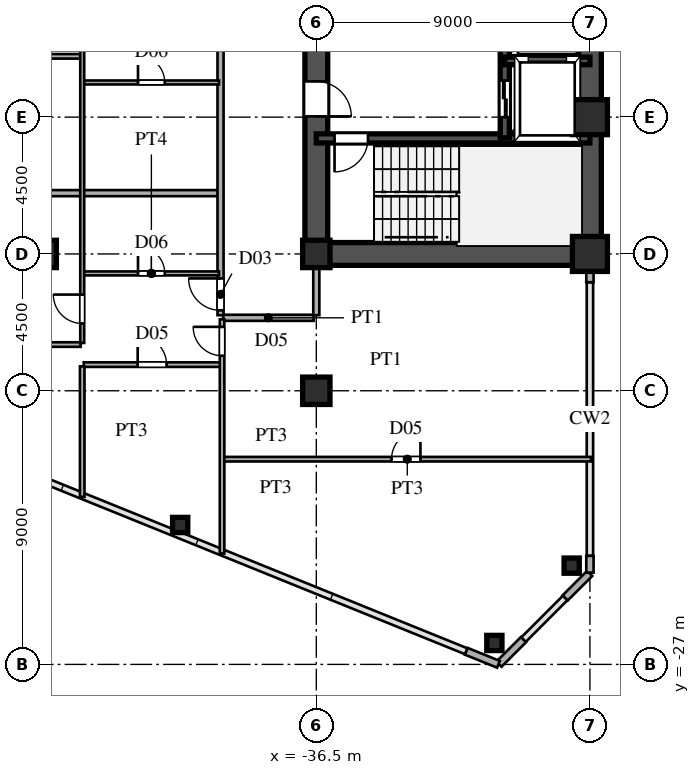
"""IFC4 building model, lengths in metres.
Left out: names, types, materials, properties, quantities, classifications, styles, units other than length and angle.
Written with IfcOpenShell. Run it as: python <this file> out.ifc"""

import sys

from ifc_helpers import new_model, si_unit, direction, frame, frame_2d, origin, origin_2d, place, context, subcontext, project, spatial, rectangle, hollow_rectangle, i_section, extrude, source, transform, mapped, element, fill, save


model = new_model("IFC4")
c1 = context("Model", 3, precision=1e-05, world=origin(), true_north=direction((0.0, 1.0)))
c2 = subcontext(c1, "Body", "Model", "MODEL_VIEW")
j1 = project(units=[si_unit("LENGTHUNIT", "METRE"), si_unit("PLANEANGLEUNIT", "RADIAN")], contexts=[c1])
p1 = place(None, origin())
s1 = spatial("IfcSite", under=j1, at=p1, CompositionType="ELEMENT")
p2 = place(p1, origin())
s2 = spatial("IfcBuilding", under=s1, at=p2, CompositionType="ELEMENT")
p3 = place(p2, frame((0.0, 0.0, 29.7)))
s3 = spatial("IfcBuildingStorey", under=s2, at=p3, CompositionType="ELEMENT", Elevation=29.7)
m1 = source(origin(), c2, "Body", "SweptSolid", [
    extrude(hollow_rectangle(XDim=1.15, YDim=1.15, WallThickness=0.048, at=origin_2d()), origin(), (0.0, 0.0, 1.0), 3.6),
])
for number, where, z_axis, x_axis in (
    (1, (-27.5, -13.5, 0.0), (0.0, 0.0, 1.0), (1.0, 0.0, 0.0)),
    (2, (-27.5, -9.0, 0.0), (0.0, 0.0, 1.0), (1.0, 0.0, 0.0)),
):
    element("IfcColumn", number, at=place(p3, frame(where, z_axis=z_axis, x_axis=x_axis)), inside=s3, PredefinedType="COLUMN", context=c2, shape_type="MappedRepresentation", body=[
        mapped(m1, transform((0.0, 0.0, 0.0), scale=1.0)),
    ])
m2 = source(origin(), c2, "Body", "SweptSolid", [
    extrude(i_section(OverallWidth=0.9, OverallDepth=0.9, WebThickness=0.036, FlangeThickness=0.055, at=origin_2d()), origin(), (0.0, 0.0, 1.0), 3.6),
])
for number, where, z_axis, x_axis in (
    (3, (-36.5, -18.0, 0.0), (0.0, 0.0, 1.0), (1.0, 0.0, 0.0)),
    (4, (-36.5, -13.5, 0.0), (0.0, 0.0, 1.0), (1.0, 0.0, 0.0)),
    (5, (-45.5, -13.5, 0.0), (0.0, 0.0, 1.0), (1.0, 0.0, 0.0)),
):
    element("IfcColumn", number, at=place(p3, frame(where, z_axis=z_axis, x_axis=x_axis)), inside=s3, PredefinedType="COLUMN", context=c2, shape_type="MappedRepresentation", body=[
        mapped(m2, transform((0.0, 0.0, 0.0), scale=1.0)),
    ])
m3 = source(origin(), c2, "Body", "SweptSolid", [
    extrude(hollow_rectangle(XDim=0.5, YDim=0.5, WallThickness=0.02, at=origin_2d()), origin(), (0.0, 0.0, 1.0), 3.6),
])
for number, where, z_axis, x_axis in (
    (6, (-28.1, -23.751, 0.0), (0.0, 0.0, 1.0), (1.0, 0.0, 0.0)),
    (7, (-30.643, -26.295, 0.0), (0.0, 0.0, 1.0), (1.0, 0.0, 0.0)),
    (8, (-40.977, -22.414, 0.0), (0.0, 0.0, 1.0), (1.0, 0.0, 0.0)),
):
    element("IfcColumn", number, at=place(p3, frame(where, z_axis=z_axis, x_axis=x_axis)), inside=s3, PredefinedType="COLUMN", context=c2, shape_type="MappedRepresentation", body=[
        mapped(m3, transform((0.0, 0.0, 0.0), scale=1.0)),
    ])
p4 = place(p3, frame((-27.5, -23.98, 0.0), z_axis=(0.0, 0.0, 1.0), x_axis=(0.0, 1.0, 0.0)))
e9 = element("IfcWall", 9, at=p4, inside=s3, PredefinedType="SOLIDWALL", context=c2, shape_type="SweptSolid", body=[
    extrude(rectangle(XDim=0.55, YDim=0.24, at=frame_2d((0.275, 0.0))), origin(), (0.0, 0.0, 1.0), 3.38),
])
p5 = place(p3, frame((-27.5, -14.43, 0.0), z_axis=(0.0, 0.0, 1.0), x_axis=(0.0, 1.0, 0.0)))
e10 = element("IfcWall", 10, at=p5, inside=s3, PredefinedType="SOLIDWALL", context=c2, shape_type="SweptSolid", body=[
    extrude(rectangle(XDim=0.55, YDim=0.24, at=frame_2d((0.275, 0.0))), origin(), (0.0, 0.0, 1.0), 2.88),
])
p6 = place(p3, frame((-31.566, -26.569, 0.0), z_axis=(0.0, 0.0, 1.0), x_axis=(0.927007103665, -0.375043770452, 0.0)))
e11 = element("IfcWall", 11, at=p6, inside=s3, PredefinedType="SOLIDWALL", context=c2, shape_type="SweptSolid", body=[
    extrude(rectangle(XDim=1.14, YDim=0.24, at=frame_2d((0.57, 0.0))), origin(), (0.0, 0.0, 1.0), 3.38),
])
for number, where, z_axis, x_axis in (
    (12, (-30.493, -26.993, 0.0), (0.0, 0.0, 1.0), (0.707, 0.707, 0.0)),
    (13, (-28.313, -24.813, 0.0), (0.0, 0.0, 1.0), (0.707, 0.707, 0.0)),
):
    element("IfcWall", number, at=place(p3, frame(where, z_axis=z_axis, x_axis=x_axis)), inside=s3, PredefinedType="SOLIDWALL", context=c2, shape_type="SweptSolid", body=[
        extrude(rectangle(XDim=1.14, YDim=0.24, at=frame_2d((0.57, 0.0))), origin(), (0.0, 0.0, 1.0), 3.38),
    ])
p7 = place(p3, frame((-27.5, -13.5, 0.0), z_axis=(0.0, 0.0, 1.0), x_axis=(0.0, 1.0, 0.0)))
e14 = element("IfcWall", 14, at=p7, inside=s3, PredefinedType="SHEAR", context=c2, shape_type="SweptSolid", body=[
    extrude(rectangle(XDim=12.2, YDim=0.75, at=frame_2d((6.1, 0.0))), origin(), (0.0, 0.0, 1.0), 3.38),
])
p8 = place(p3, frame((-36.5, -13.5, 0.0), z_axis=(0.0, 0.0, 1.0), x_axis=(1.0, 0.0, 0.0)))
e15 = element("IfcWall", 15, at=p8, inside=s3, PredefinedType="SHEAR", context=c2, shape_type="SweptSolid", body=[
    extrude(rectangle(XDim=9.0, YDim=0.75, at=frame_2d((4.5, 0.0))), origin(), (0.0, 0.0, 1.0), 3.38),
])
p9 = place(p3, frame((-36.5, -13.65, 0.0), z_axis=(0.0, 0.0, 1.0), x_axis=(0.0, 1.0, 0.0)))
e16 = element("IfcWall", 16, at=p9, inside=s3, PredefinedType="SHEAR", context=c2, shape_type="SweptSolid", body=[
    extrude(rectangle(XDim=7.15, YDim=0.75, at=frame_2d((3.575, 0.0))), origin(), (0.0, 0.0, 1.0), 3.38),
])
p10 = place(p9, frame((4.675, 0.0, 0.0)))
e17 = element("IfcOpeningElement", 17, at=p10, cuts=e16, PredefinedType="OPENING", context=c2, shape_type="SweptSolid", body=[
    extrude(rectangle(XDim=1.15, YDim=2.2, at=frame_2d((0.575, 1.1))), frame((0.0, 0.385, 0.0), z_axis=(0.0, -1.0, 0.0), x_axis=(1.0, 0.0, 0.0)), (0.0, 0.0, 1.0), 0.77),
])
p11 = place(p3, frame((-36.5, -9.7, 0.0), z_axis=(0.0, 0.0, 1.0), x_axis=(1.0, 0.0, 0.0)))
e18 = element("IfcWall", 18, at=p11, inside=s3, PredefinedType="SHEAR", context=c2, shape_type="SweptSolid", body=[
    extrude(rectangle(XDim=9.0, YDim=0.3, at=frame_2d((4.5, 0.0))), origin(), (0.0, 0.0, 1.0), 3.38),
])
p12 = place(p11, frame((0.6, 0.0, 0.0)))
e19 = element("IfcOpeningElement", 19, at=p12, cuts=e18, PredefinedType="OPENING", context=c2, shape_type="SweptSolid", body=[
    extrude(rectangle(XDim=1.1, YDim=2.2, at=frame_2d((0.55, 1.1))), frame((0.0, 0.16, 0.0), z_axis=(0.0, -1.0, 0.0), x_axis=(1.0, 0.0, 0.0)), (0.0, 0.0, 1.0), 0.32),
])
p13 = place(p3, frame((-30.3, -7.15, 0.0), z_axis=(0.0, 0.0, 1.0), x_axis=(1.0, 0.0, 0.0)))
e20 = element("IfcWall", 20, at=p13, inside=s3, PredefinedType="SHEAR", context=c2, shape_type="SweptSolid", body=[
    extrude(rectangle(XDim=2.8, YDim=0.25, at=frame_2d((1.4, 0.0))), origin(), (0.0, 0.0, 1.0), 3.38),
])
p14 = place(p3, frame((-30.3, -9.68, 0.0), z_axis=(0.0, 0.0, 1.0), x_axis=(0.0, 1.0, 0.0)))
e21 = element("IfcWall", 21, at=p14, inside=s3, PredefinedType="SHEAR", context=c2, shape_type="SweptSolid", body=[
    extrude(rectangle(XDim=2.56, YDim=0.3, at=frame_2d((1.28, 0.0))), origin(), (0.0, 0.0, 1.0), 3.38),
])
p15 = place(p14, frame((0.68, 0.0, 0.0)))
e22 = element("IfcOpeningElement", 22, at=p15, cuts=e21, PredefinedType="OPENING", context=c2, shape_type="SweptSolid", body=[
    extrude(rectangle(XDim=1.2, YDim=2.25, at=frame_2d((0.6, 1.125))), frame((0.0, 0.16, 0.0), z_axis=(0.0, -1.0, 0.0), x_axis=(1.0, 0.0, 0.0)), (0.0, 0.0, 1.0), 0.32),
])
p16 = place(p3, frame((-30.3, -7.12, 0.0), z_axis=(0.0, 0.0, 1.0), x_axis=(0.0, 1.0, 0.0)))
e23 = element("IfcWall", 23, at=p16, inside=s3, PredefinedType="SHEAR", context=c2, shape_type="SweptSolid", body=[
    extrude(rectangle(XDim=2.92, YDim=0.3, at=frame_2d((1.46, 0.0))), origin(), (0.0, 0.0, 1.0), 3.38),
])
p17 = place(p16, frame((0.91, 0.0, 0.0)))
e24 = element("IfcOpeningElement", 24, at=p17, cuts=e23, PredefinedType="OPENING", context=c2, shape_type="SweptSolid", body=[
    extrude(rectangle(XDim=1.1, YDim=2.2, at=frame_2d((0.55, 1.1))), frame((0.0, 0.16, 0.0), z_axis=(0.0, -1.0, 0.0), x_axis=(1.0, 0.0, 0.0)), (0.0, 0.0, 1.0), 0.32),
])
p18 = place(p3, frame((-39.55, -20.25, 0.0), z_axis=(0.0, 0.0, 1.0), x_axis=(1.0, 0.0, 0.0)))
e25 = element("IfcWall", 25, at=p18, inside=s3, PredefinedType="PARTITIONING", context=c2, shape_type="SweptSolid", body=[
    extrude(rectangle(XDim=12.085, YDim=0.15, at=frame_2d((6.042, 0.0))), origin(), (0.0, 0.0, 1.0), 3.38),
])
p19 = place(p18, frame((5.525, 0.0, 0.0)))
e26 = element("IfcOpeningElement", 26, at=p19, cuts=e25, PredefinedType="OPENING", context=c2, shape_type="SweptSolid", body=[
    extrude(rectangle(XDim=0.95, YDim=2.15, at=frame_2d((0.475, 1.075))), frame((0.0, 0.085, 0.0), z_axis=(0.0, -1.0, 0.0), x_axis=(1.0, 0.0, 0.0)), (0.0, 0.0, 1.0), 0.17),
])
p20 = place(p3, frame((-44.15, -17.14, 0.0), z_axis=(0.0, 0.0, 1.0), x_axis=(1.0, 0.0, 0.0)))
e27 = element("IfcWall", 27, at=p20, inside=s3, PredefinedType="PARTITIONING", context=c2, shape_type="SweptSolid", body=[
    extrude(rectangle(XDim=4.5, YDim=0.15, at=frame_2d((2.25, 0.0))), origin(), (0.0, 0.0, 1.0), 3.38),
])
p21 = place(p20, frame((1.775, 0.0, 0.0)))
e28 = element("IfcOpeningElement", 28, at=p21, cuts=e27, PredefinedType="OPENING", context=c2, shape_type="SweptSolid", body=[
    extrude(rectangle(XDim=0.95, YDim=2.15, at=frame_2d((0.475, 1.075))), frame((0.0, 0.085, 0.0), z_axis=(0.0, -1.0, 0.0), x_axis=(1.0, 0.0, 0.0)), (0.0, 0.0, 1.0), 0.17),
])
p22 = place(p3, frame((-54.45, -16.48, 0.0), z_axis=(0.0, 0.0, 1.0), x_axis=(1.0, 0.0, 0.0)))
e29 = element("IfcWall", 29, at=p22, inside=s3, PredefinedType="PARTITIONING", context=c2, shape_type="SweptSolid", body=[
    extrude(rectangle(XDim=10.2, YDim=0.15, at=frame_2d((5.1, 0.0))), origin(), (0.0, 0.0, 1.0), 3.38),
])
p23 = place(p22, frame((4.625, 0.0, 0.0)))
e30 = element("IfcOpeningElement", 30, at=p23, cuts=e29, PredefinedType="OPENING", context=c2, shape_type="SweptSolid", body=[
    extrude(rectangle(XDim=0.95, YDim=2.15, at=frame_2d((0.475, 1.075))), frame((0.0, 0.085, 0.0), z_axis=(0.0, -1.0, 0.0), x_axis=(1.0, 0.0, 0.0)), (0.0, 0.0, 1.0), 0.17),
])
p24 = place(p3, frame((-39.565, -15.6, 0.0), z_axis=(0.0, 0.0, 1.0), x_axis=(1.0, 0.0, 0.0)))
e31 = element("IfcWall", 31, at=p24, inside=s3, PredefinedType="PARTITIONING", context=c2, shape_type="SweptSolid", body=[
    extrude(rectangle(XDim=2.98, YDim=0.2, at=frame_2d((1.49, 0.0))), origin(), (0.0, 0.0, 1.0), 3.38),
])
p25 = place(p3, frame((-44.15, -14.14, 0.0), z_axis=(0.0, 0.0, 1.0), x_axis=(1.0, 0.0, 0.0)))
e32 = element("IfcWall", 32, at=p25, inside=s3, PredefinedType="PARTITIONING", context=c2, shape_type="SweptSolid", body=[
    extrude(rectangle(XDim=4.45, YDim=0.13, at=frame_2d((2.225, 0.0))), origin(), (0.0, 0.0, 1.0), 3.38),
])
p26 = place(p25, frame((1.785, 0.0, 0.0)))
e33 = element("IfcOpeningElement", 33, at=p26, cuts=e32, PredefinedType="OPENING", context=c2, shape_type="SweptSolid", body=[
    extrude(rectangle(XDim=0.88, YDim=2.1, at=frame_2d((0.44, 1.05))), frame((0.0, 0.075, 0.0), z_axis=(0.0, -1.0, 0.0), x_axis=(1.0, 0.0, 0.0)), (0.0, 0.0, 1.0), 0.15),
])
p27 = place(p3, frame((-68.807, -11.5, 0.0), z_axis=(0.0, 0.0, 1.0), x_axis=(1.0, 0.0, 0.0)))
e34 = element("IfcWall", 34, at=p27, inside=s3, PredefinedType="PARTITIONING", context=c2, shape_type="SweptSolid", body=[
    extrude(rectangle(XDim=29.077, YDim=0.2, at=frame_2d((14.539, 0.0))), origin(), (0.0, 0.0, 1.0), 3.38),
])
p28 = place(p3, frame((-44.15, -7.86, 0.0), z_axis=(0.0, 0.0, 1.0), x_axis=(1.0, 0.0, 0.0)))
e35 = element("IfcWall", 35, at=p28, inside=s3, PredefinedType="PARTITIONING", context=c2, shape_type="SweptSolid", body=[
    extrude(rectangle(XDim=4.45, YDim=0.13, at=frame_2d((2.225, 0.0))), origin(), (0.0, 0.0, 1.0), 3.38),
])
p29 = place(p28, frame((1.785, 0.0, 0.0)))
e36 = element("IfcOpeningElement", 36, at=p29, cuts=e35, PredefinedType="OPENING", context=c2, shape_type="SweptSolid", body=[
    extrude(rectangle(XDim=0.88, YDim=2.1, at=frame_2d((0.44, 1.05))), frame((0.0, 0.075, 0.0), z_axis=(0.0, -1.0, 0.0), x_axis=(1.0, 0.0, 0.0)), (0.0, 0.0, 1.0), 0.15),
])
p30 = place(p3, frame((-72.535, -7.0, 0.0), z_axis=(0.0, 0.0, 1.0), x_axis=(1.0, 0.0, 0.0)))
e37 = element("IfcWall", 37, at=p30, inside=s3, PredefinedType="PARTITIONING", context=c2, shape_type="SweptSolid", body=[
    extrude(rectangle(XDim=28.285, YDim=0.15, at=frame_2d((14.143, 0.0))), origin(), (0.0, 0.0, 1.0), 3.38),
])
p31 = place(p30, frame((22.71, 0.0, 0.0)))
e38 = element("IfcOpeningElement", 38, at=p31, cuts=e37, PredefinedType="OPENING", context=c2, shape_type="SweptSolid", body=[
    extrude(rectangle(XDim=0.95, YDim=2.15, at=frame_2d((0.475, 1.075))), frame((0.0, 0.085, 0.0), z_axis=(0.0, -1.0, 0.0), x_axis=(1.0, 0.0, 0.0)), (0.0, 0.0, 1.0), 0.17),
])
p32 = place(p30, frame((14.71, 0.0, 0.0)))
e39 = element("IfcOpeningElement", 39, at=p32, cuts=e37, PredefinedType="OPENING", context=c2, shape_type="SweptSolid", body=[
    extrude(rectangle(XDim=0.95, YDim=2.15, at=frame_2d((0.475, 1.075))), frame((0.0, 0.085, 0.0), z_axis=(0.0, -1.0, 0.0), x_axis=(1.0, 0.0, 0.0)), (0.0, 0.0, 1.0), 0.17),
])
p33 = place(p3, frame((-44.2, -21.49, 0.0), z_axis=(0.0, 0.0, 1.0), x_axis=(0.0, 1.0, 0.0)))
e40 = element("IfcWall", 40, at=p33, inside=s3, PredefinedType="PARTITIONING", context=c2, shape_type="SweptSolid", body=[
    extrude(rectangle(XDim=4.295, YDim=0.15, at=frame_2d((2.147, 0.0))), origin(), (0.0, 0.0, 1.0), 3.38),
])
p34 = place(p3, frame((-44.2, -16.427, 0.0), z_axis=(0.0, 0.0, 1.0), x_axis=(0.0, 1.0, 0.0)))
e41 = element("IfcWall", 41, at=p34, inside=s3, PredefinedType="PARTITIONING", context=c2, shape_type="SweptSolid", body=[
    extrude(rectangle(XDim=13.877, YDim=0.13, at=frame_2d((6.938, 0.0))), origin(), (0.0, 0.0, 1.0), 3.38),
])
p35 = place(p34, frame((0.641, 0.0, 0.0)))
e42 = element("IfcOpeningElement", 42, at=p35, cuts=e41, PredefinedType="OPENING", context=c2, shape_type="SweptSolid", body=[
    extrude(rectangle(XDim=0.95, YDim=2.15, at=frame_2d((0.475, 1.075))), frame((0.0, 0.075, 0.0), z_axis=(0.0, -1.0, 0.0), x_axis=(1.0, 0.0, 0.0)), (0.0, 0.0, 1.0), 0.15),
])
p36 = place(p34, frame((10.454, 0.0, 0.0)))
e43 = element("IfcOpeningElement", 43, at=p36, cuts=e41, PredefinedType="OPENING", context=c2, shape_type="SweptSolid", body=[
    extrude(rectangle(XDim=0.95, YDim=2.15, at=frame_2d((0.475, 1.075))), frame((0.0, 0.075, 0.0), z_axis=(0.0, -1.0, 0.0), x_axis=(1.0, 0.0, 0.0)), (0.0, 0.0, 1.0), 0.15),
])
p37 = place(p3, frame((-39.65, -15.515, 0.0), z_axis=(0.0, 0.0, 1.0), x_axis=(0.0, 1.0, 0.0)))
e44 = element("IfcWall", 44, at=p37, inside=s3, PredefinedType="PARTITIONING", context=c2, shape_type="SweptSolid", body=[
    extrude(rectangle(XDim=31.03, YDim=0.2, at=frame_2d((15.515, 0.0))), origin(), (0.0, 0.0, 1.0), 3.38),
])
p38 = place(p37, frame((0.16, 0.0, 0.0)))
e45 = element("IfcOpeningElement", 45, at=p38, cuts=e44, PredefinedType="OPENING", context=c2, shape_type="SweptSolid", body=[
    extrude(rectangle(XDim=1.05, YDim=2.25, at=frame_2d((0.525, 1.125))), frame((0.0, 0.11, 0.0), z_axis=(0.0, -1.0, 0.0), x_axis=(1.0, 0.0, 0.0)), (0.0, 0.0, 1.0), 0.22),
])
p39 = place(p37, frame((10.038, 0.0, 0.0)))
e46 = element("IfcOpeningElement", 46, at=p39, cuts=e44, PredefinedType="OPENING", context=c2, shape_type="SweptSolid", body=[
    extrude(rectangle(XDim=1.05, YDim=2.25, at=frame_2d((0.525, 1.125))), frame((0.0, 0.11, 0.0), z_axis=(0.0, -1.0, 0.0), x_axis=(1.0, 0.0, 0.0)), (0.0, 0.0, 1.0), 0.22),
])
p40 = place(p37, frame((21.638, 0.0, 0.0)))
e47 = element("IfcOpeningElement", 47, at=p40, cuts=e44, PredefinedType="OPENING", context=c2, shape_type="SweptSolid", body=[
    extrude(rectangle(XDim=1.05, YDim=2.25, at=frame_2d((0.525, 1.125))), frame((0.0, 0.11, 0.0), z_axis=(0.0, -1.0, 0.0), x_axis=(1.0, 0.0, 0.0)), (0.0, 0.0, 1.0), 0.22),
])
p41 = place(p37, frame((29.82, 0.0, 0.0)))
e48 = element("IfcOpeningElement", 48, at=p41, cuts=e44, PredefinedType="OPENING", context=c2, shape_type="SweptSolid", body=[
    extrude(rectangle(XDim=1.05, YDim=2.25, at=frame_2d((0.525, 1.125))), frame((0.0, 0.11, 0.0), z_axis=(0.0, -1.0, 0.0), x_axis=(1.0, 0.0, 0.0)), (0.0, 0.0, 1.0), 0.22),
])
p42 = place(p3, frame((-39.6, -23.352, 0.0), z_axis=(0.0, 0.0, 1.0), x_axis=(0.0, 1.0, 0.0)))
e49 = element("IfcWall", 49, at=p42, inside=s3, PredefinedType="PARTITIONING", context=c2, shape_type="SweptSolid", body=[
    extrude(rectangle(XDim=7.702, YDim=0.15, at=frame_2d((3.851, 0.0))), origin(), (0.0, 0.0, 1.0), 3.38),
])
p43 = place(p42, frame((6.504, 0.0, 0.0)))
e50 = element("IfcOpeningElement", 50, at=p43, cuts=e49, PredefinedType="OPENING", context=c2, shape_type="SweptSolid", body=[
    extrude(rectangle(XDim=0.95, YDim=2.15, at=frame_2d((0.475, 1.075))), frame((0.0, 0.085, 0.0), z_axis=(0.0, -1.0, 0.0), x_axis=(1.0, 0.0, 0.0)), (0.0, 0.0, 1.0), 0.17),
])
p44 = place(p3, frame((-36.5, -15.515, 0.0), z_axis=(0.0, 0.0, 1.0), x_axis=(0.0, 1.0, 0.0)))
e51 = element("IfcWall", 51, at=p44, inside=s3, PredefinedType="PARTITIONING", context=c2, shape_type="SweptSolid", body=[
    extrude(rectangle(XDim=1.635, YDim=0.2, at=frame_2d((0.817, 0.0))), origin(), (0.0, 0.0, 1.0), 2.68),
])
m4 = source(origin(), c2, "Body", "SweptSolid", [
    extrude(rectangle(XDim=1.15, YDim=2.2, at=frame_2d((0.575, 1.1))), frame((0.0, 0.025, 0.0), z_axis=(0.0, -1.0, 0.0), x_axis=(1.0, 0.0, 0.0)), (0.0, 0.0, 1.0), 0.05),
])
p45 = place(p10, frame((1.15, 0.0, 0.0), z_axis=(0.0, 0.0, 1.0), x_axis=(-1.0, 0.0, 0.0)))
e52 = element("IfcDoor", 52, at=p45, inside=s3, OperationType="SINGLE_SWING_LEFT", PredefinedType="DOOR", context=c2, shape_type="MappedRepresentation", body=[
    mapped(m4, transform((0.0, 0.0, 0.0), scale=1.0)),
])
fill(e17, e52)
m5 = source(origin(), c2, "Body", "SweptSolid", [
    extrude(rectangle(XDim=1.1, YDim=2.2, at=frame_2d((0.55, 1.1))), frame((0.0, 0.025, 0.0), z_axis=(0.0, -1.0, 0.0), x_axis=(1.0, 0.0, 0.0)), (0.0, 0.0, 1.0), 0.05),
])
p46 = place(p12, frame((1.1, 0.0, 0.0), z_axis=(0.0, 0.0, 1.0), x_axis=(-1.0, 0.0, 0.0)))
e53 = element("IfcDoor", 53, at=p46, inside=s3, OperationType="SINGLE_SWING_LEFT", PredefinedType="DOOR", context=c2, shape_type="MappedRepresentation", body=[
    mapped(m5, transform((0.0, 0.0, 0.0), scale=1.0)),
])
fill(e19, e53)
m6 = source(origin(), c2, "Body", "SweptSolid", [
    extrude(rectangle(XDim=1.2, YDim=2.25, at=frame_2d((0.6, 1.125))), frame((0.0, 0.025, 0.0), z_axis=(0.0, -1.0, 0.0), x_axis=(1.0, 0.0, 0.0)), (0.0, 0.0, 1.0), 0.05),
])
p47 = place(p15, origin())
e54 = element("IfcDoor", 54, at=p47, inside=s3, OperationType="DOUBLE_DOOR_SLIDING", PredefinedType="DOOR", context=c2, shape_type="MappedRepresentation", body=[
    mapped(m6, transform((0.0, 0.0, 0.0), scale=1.0)),
])
fill(e22, e54)
m7 = source(origin(), c2, "Body", "SweptSolid", [
    extrude(rectangle(XDim=0.95, YDim=2.15, at=frame_2d((0.475, 1.075))), frame((0.0, 0.025, 0.0), z_axis=(0.0, -1.0, 0.0), x_axis=(1.0, 0.0, 0.0)), (0.0, 0.0, 1.0), 0.05),
])
p48 = place(p19, origin())
e55 = element("IfcDoor", 55, at=p48, inside=s3, OperationType="SINGLE_SWING_RIGHT", PredefinedType="DOOR", context=c2, shape_type="MappedRepresentation", body=[
    mapped(m7, transform((0.0, 0.0, 0.0), scale=1.0)),
])
fill(e26, e55)
p49 = place(p21, origin())
e56 = element("IfcDoor", 56, at=p49, inside=s3, OperationType="SINGLE_SWING_LEFT", PredefinedType="DOOR", context=c2, shape_type="MappedRepresentation", body=[
    mapped(m7, transform((0.0, 0.0, 0.0), scale=1.0)),
])
fill(e28, e56)
m8 = source(origin(), c2, "Body", "SweptSolid", [
    extrude(rectangle(XDim=0.88, YDim=2.1, at=frame_2d((0.44, 1.05))), frame((0.0, 0.025, 0.0), z_axis=(0.0, -1.0, 0.0), x_axis=(1.0, 0.0, 0.0)), (0.0, 0.0, 1.0), 0.05),
])
p50 = place(p26, origin())
e57 = element("IfcDoor", 57, at=p50, inside=s3, OperationType="SINGLE_SWING_LEFT", PredefinedType="DOOR", context=c2, shape_type="MappedRepresentation", body=[
    mapped(m8, transform((0.0, 0.0, 0.0), scale=1.0)),
])
fill(e33, e57)
p51 = place(p29, origin())
e58 = element("IfcDoor", 58, at=p51, inside=s3, OperationType="SINGLE_SWING_LEFT", PredefinedType="DOOR", context=c2, shape_type="MappedRepresentation", body=[
    mapped(m8, transform((0.0, 0.0, 0.0), scale=1.0)),
])
fill(e36, e58)
p52 = place(p35, origin())
e59 = element("IfcDoor", 59, at=p52, inside=s3, OperationType="SINGLE_SWING_RIGHT", PredefinedType="DOOR", context=c2, shape_type="MappedRepresentation", body=[
    mapped(m7, transform((0.0, 0.0, 0.0), scale=1.0)),
])
fill(e42, e59)
m9 = source(origin(), c2, "Body", "SweptSolid", [
    extrude(rectangle(XDim=1.05, YDim=2.25, at=frame_2d((0.525, 1.125))), frame((0.0, 0.025, 0.0), z_axis=(0.0, -1.0, 0.0), x_axis=(1.0, 0.0, 0.0)), (0.0, 0.0, 1.0), 0.05),
])
p53 = place(p38, origin())
e60 = element("IfcDoor", 60, at=p53, inside=s3, OperationType="SINGLE_SWING_RIGHT", PredefinedType="DOOR", context=c2, shape_type="MappedRepresentation", body=[
    mapped(m9, transform((0.0, 0.0, 0.0), scale=1.0)),
])
fill(e45, e60)
p54 = place(p43, origin())
e61 = element("IfcDoor", 61, at=p54, inside=s3, OperationType="SINGLE_SWING_RIGHT", PredefinedType="DOOR", context=c2, shape_type="MappedRepresentation", body=[
    mapped(m7, transform((0.0, 0.0, 0.0), scale=1.0)),
])
fill(e50, e61)
save(model, sys.argv[1])
